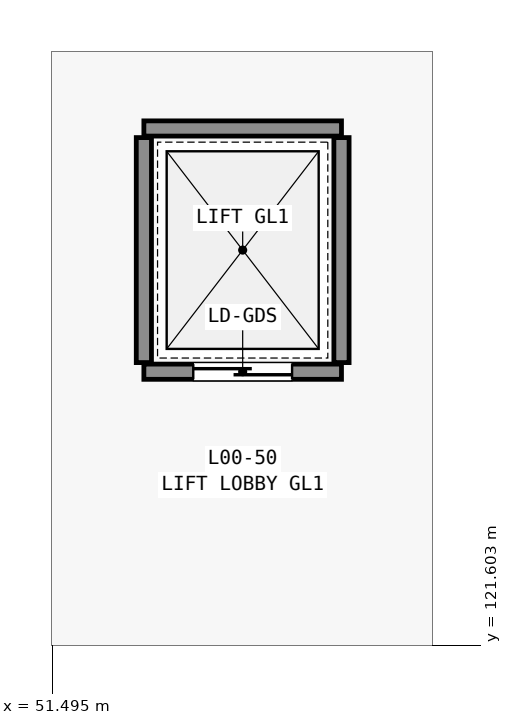
"""IFC4 building model, lengths in metres.
Left out: names, types, materials, properties, quantities, classifications, styles, units other than length and angle.
Written with IfcOpenShell. Run it as: python <this file> out.ifc"""

import sys

from ifc_helpers import new_model, si_unit, direction, frame, frame_2d, origin, place, context, subcontext, project, spatial, rectangle, extrude, element, fill, save


model = new_model("IFC4")
c1 = context("Model", 3, precision=1e-05, world=origin(), true_north=direction((0.0, 1.0)))
c2 = subcontext(c1, "Body", "Model", "MODEL_VIEW")
j1 = project(units=[si_unit("LENGTHUNIT", "METRE"), si_unit("PLANEANGLEUNIT", "RADIAN")], contexts=[c1])
p1 = place(None, origin())
s1 = spatial("IfcSite", under=j1, at=p1, CompositionType="ELEMENT")
p2 = place(p1, origin())
s2 = spatial("IfcBuilding", under=s1, at=p2, CompositionType="ELEMENT")
p3 = place(p2, origin())
s3 = spatial("IfcBuildingStorey", under=s2, at=p3, CompositionType="ELEMENT", Elevation=0.0)
p4 = place(p3, frame((52.7, 125.2, 0.0), z_axis=(0.0, 0.0, 1.0), x_axis=(1.0, 0.0, 0.0)))
e1 = element("IfcWall", 1, at=p4, inside=s3, PredefinedType="STANDARD", context=c2, shape_type="SweptSolid", body=[
    extrude(rectangle(XDim=2.6, YDim=0.2, at=frame_2d((1.3, 0.0))), origin(), (0.0, 0.0, 1.0), 5.64),
])
p5 = place(p4, frame((0.65, 0.0, 0.0)))
e2 = element("IfcOpeningElement", 2, at=p5, cuts=e1, PredefinedType="OPENING", context=c2, shape_type="SweptSolid", body=[
    extrude(rectangle(XDim=1.3, YDim=2.15, at=frame_2d((0.65, 1.075))), frame((0.0, 0.11, 0.0), z_axis=(0.0, -1.0, 0.0), x_axis=(1.0, 0.0, 0.0)), (0.0, 0.0, 1.0), 0.22),
])
p6 = place(p3, frame((52.7, 128.4, 0.0), z_axis=(0.0, 0.0, 1.0), x_axis=(1.0, 0.0, 0.0)))
e3 = element("IfcWall", 3, at=p6, inside=s3, PredefinedType="STANDARD", context=c2, shape_type="SweptSolid", body=[
    extrude(rectangle(XDim=2.6, YDim=0.2, at=frame_2d((1.3, 0.0))), origin(), (0.0, 0.0, 1.0), 5.64),
])
for number, where, z_axis, x_axis in (
    (4, (52.7, 125.32, 0.0), (0.0, 0.0, 1.0), (0.0, 1.0, 0.0)),
    (5, (55.3, 125.32, 0.0), (0.0, 0.0, 1.0), (0.0, 1.0, 0.0)),
):
    element("IfcWall", number, at=place(p3, frame(where, z_axis=z_axis, x_axis=x_axis)), inside=s3, PredefinedType="STANDARD", context=c2, shape_type="SweptSolid", body=[
        extrude(rectangle(XDim=2.96, YDim=0.2, at=frame_2d((1.48, 0.0))), origin(), (0.0, 0.0, 1.0), 5.64),
    ])
p7 = place(p5, origin())
e6 = element("IfcDoor", 6, at=p7, inside=s3, OperationType="SLIDING_TO_LEFT", PredefinedType="DOOR", context=c2, shape_type="SweptSolid", body=[
    extrude(rectangle(XDim=1.3, YDim=2.15, at=frame_2d((0.65, 1.075))), frame((0.0, 0.025, 0.0), z_axis=(0.0, -1.0, 0.0), x_axis=(1.0, 0.0, 0.0)), (0.0, 0.0, 1.0), 0.05),
])
fill(e2, e6)
save(model, sys.argv[1])
